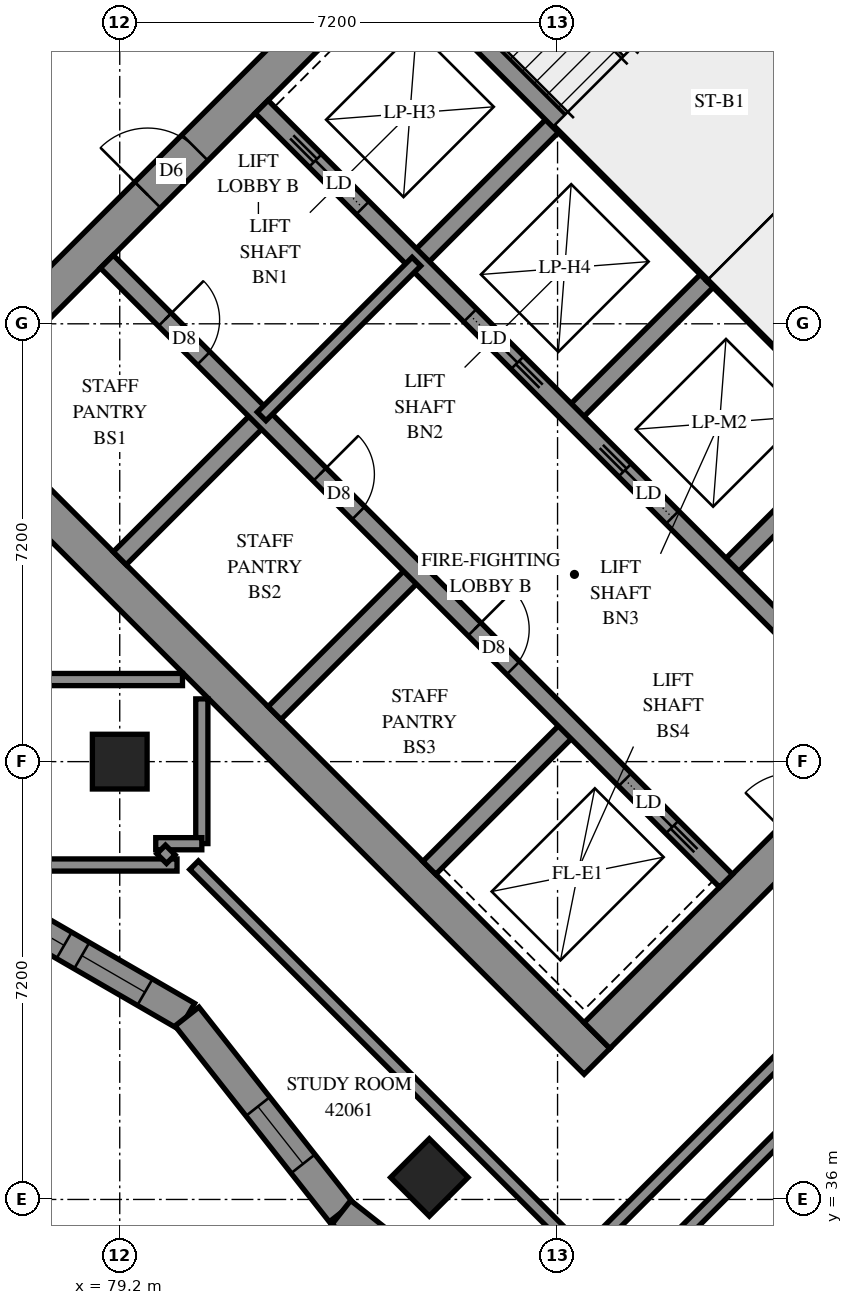
"""IFC4 building model, lengths in metres.
Left out: names, types, materials, properties, quantities, classifications, styles, units other than length and angle.
Written with IfcOpenShell. Run it as: python <this file> out.ifc"""

import sys

from ifc_helpers import new_model, si_unit, direction, frame, frame_2d, origin, origin_2d, place, context, subcontext, project, spatial, polyline, rectangle, outline, extrude, element, fill, save


model = new_model("IFC4")
c1 = context("Model", 3, precision=1e-05, world=origin(), true_north=direction((0.0, 1.0)))
c2 = subcontext(c1, "Body", "Model", "MODEL_VIEW")
j1 = project(units=[si_unit("LENGTHUNIT", "METRE"), si_unit("PLANEANGLEUNIT", "RADIAN")], contexts=[c1])
p1 = place(None, origin())
s1 = spatial("IfcSite", under=j1, at=p1, CompositionType="ELEMENT")
p2 = place(p1, origin())
s2 = spatial("IfcBuilding", under=s1, at=p2, CompositionType="ELEMENT")
p3 = place(p2, frame((0.0, 0.0, 155.8)))
s3 = spatial("IfcBuildingStorey", under=s2, at=p3, CompositionType="ELEMENT", Elevation=155.8)
for number, where, z_axis, x_axis in (
    (1, (79.2, 43.2, 0.0), (0.0, 0.0, 1.0), (1.0, 0.0, 0.0)),
    (2, (84.291, 36.362, 0.0), (0.0, 0.0, 1.0), (0.707, -0.707, 0.0)),
):
    element("IfcColumn", number, at=place(p3, frame(where, z_axis=z_axis, x_axis=x_axis)), inside=s3, PredefinedType="COLUMN", context=c2, shape_type="SweptSolid", body=[
        extrude(rectangle(XDim=0.9, YDim=0.9, at=origin_2d()), origin(), (0.0, 0.0, 1.0), 3.1),
    ])
p4 = place(p3, frame((76.018, 49.302, -0.3), z_axis=(0.0, 0.0, 1.0), x_axis=(0.7071067812, -0.7071067812, 0.0)))
e3 = element("IfcWall", 3, at=p4, inside=s3, PredefinedType="SHEAR", context=c2, shape_type="SweptSolid", body=[
    extrude(rectangle(XDim=15.6, YDim=0.6, at=frame_2d((7.8, 0.0))), origin(), (0.0, 0.0, 1.0), 2.7),
])
p5 = place(p3, frame((86.625, 59.908, -0.3), z_axis=(0.0, 0.0, 1.0), x_axis=(0.7071067812, -0.7071067812, 0.0)))
e4 = element("IfcWall", 4, at=p5, inside=s3, PredefinedType="SHEAR", context=c2, shape_type="SweptSolid", body=[
    extrude(rectangle(XDim=15.6, YDim=0.6, at=frame_2d((7.8, 0.0))), origin(), (0.0, 0.0, 1.0), 2.7),
])
p6 = place(p5, frame((10.6, 0.0, 0.3)))
e5 = element("IfcOpeningElement", 5, at=p6, cuts=e4, PredefinedType="OPENING", context=c2, shape_type="SweptSolid", body=[
    extrude(rectangle(XDim=0.8, YDim=2.1, at=frame_2d((0.4, 1.05))), frame((0.0, 0.31, 0.0), z_axis=(0.0, -1.0, 0.0), x_axis=(1.0, 0.0, 0.0)), (0.0, 0.0, 1.0), 0.62),
])
p7 = place(p3, frame((76.442, 49.302, -0.3), z_axis=(0.0, 0.0, 1.0), x_axis=(0.7071067812, 0.7071067812, 0.0)))
e6 = element("IfcWall", 6, at=p7, inside=s3, PredefinedType="SHEAR", context=c2, shape_type="SweptSolid", body=[
    extrude(rectangle(XDim=14.4, YDim=0.6, at=frame_2d((7.2, 0.0))), origin(), (0.0, 0.0, 1.0), 2.7),
])
p8 = place(p7, frame((4.55, 0.0, 0.3)))
e7 = element("IfcOpeningElement", 7, at=p8, cuts=e6, PredefinedType="OPENING", context=c2, shape_type="SweptSolid", body=[
    extrude(rectangle(XDim=1.1, YDim=2.1, at=frame_2d((0.55, 1.05))), frame((0.0, 0.31, 0.0), z_axis=(0.0, -1.0, 0.0), x_axis=(1.0, 0.0, 0.0)), (0.0, 0.0, 1.0), 0.62),
])
p9 = place(p7, frame((11.35, 0.0, 0.3)))
e8 = element("IfcOpeningElement", 8, at=p9, cuts=e6, PredefinedType="OPENING", context=c2, shape_type="SweptSolid", body=[
    extrude(rectangle(XDim=1.1, YDim=2.1, at=frame_2d((0.55, 1.05))), frame((0.0, 0.31, 0.0), z_axis=(0.0, -1.0, 0.0), x_axis=(1.0, 0.0, 0.0)), (0.0, 0.0, 1.0), 0.62),
])
p10 = place(p3, frame((87.049, 38.695, -0.3), z_axis=(0.0, 0.0, 1.0), x_axis=(0.7071067812, 0.7071067812, 0.0)))
e9 = element("IfcWall", 9, at=p10, inside=s3, PredefinedType="SHEAR", context=c2, shape_type="SweptSolid", body=[
    extrude(rectangle(XDim=14.4, YDim=0.6, at=frame_2d((7.2, 0.0))), origin(), (0.0, 0.0, 1.0), 2.7),
])
p11 = place(p10, frame((4.55, 0.0, 0.3)))
e10 = element("IfcOpeningElement", 10, at=p11, cuts=e9, PredefinedType="OPENING", context=c2, shape_type="SweptSolid", body=[
    extrude(rectangle(XDim=1.1, YDim=2.1, at=frame_2d((0.55, 1.05))), frame((0.0, 0.31, 0.0), z_axis=(0.0, -1.0, 0.0), x_axis=(1.0, 0.0, 0.0)), (0.0, 0.0, 1.0), 0.62),
])
p12 = place(p10, frame((11.35, 0.0, 0.3)))
e11 = element("IfcOpeningElement", 11, at=p12, cuts=e9, PredefinedType="OPENING", context=c2, shape_type="SweptSolid", body=[
    extrude(rectangle(XDim=1.1, YDim=2.1, at=frame_2d((0.55, 1.05))), frame((0.0, 0.31, 0.0), z_axis=(0.0, -1.0, 0.0), x_axis=(1.0, 0.0, 0.0)), (0.0, 0.0, 1.0), 0.62),
])
for number, where, z_axis, x_axis in (
    (12, (79.2, 46.544, 0.0), (0.0, 0.0, 1.0), (0.707, 0.707, 0.0)),
    (13, (84.079, 51.423, 0.0), (0.0, 0.0, 1.0), (0.707, 0.707, 0.0)),
):
    element("IfcWall", number, at=place(p3, frame(where, z_axis=z_axis, x_axis=x_axis)), inside=s3, PredefinedType="SOLIDWALL", context=c2, shape_type="SweptSolid", body=[
        extrude(rectangle(XDim=3.3, YDim=0.3, at=frame_2d((1.65, 0.0))), origin(), (0.0, 0.0, 1.0), 3.1),
    ])
p13 = place(p3, frame((81.746, 43.999, 0.0), z_axis=(0.0, 0.0, 1.0), x_axis=(0.7071067812, 0.7071067812, 0.0)))
e14 = element("IfcWall", 14, at=p13, inside=s3, PredefinedType="SOLIDWALL", context=c2, shape_type="SweptSolid", body=[
    extrude(rectangle(XDim=3.3, YDim=0.3, at=frame_2d((1.65, 0.0))), origin(), (0.0, 0.0, 1.0), 3.1),
])
p14 = place(p3, frame((86.625, 48.878, 0.0), z_axis=(0.0, 0.0, 1.0), x_axis=(0.7071067812, 0.7071067812, 0.0)))
e15 = element("IfcWall", 15, at=p14, inside=s3, PredefinedType="SOLIDWALL", context=c2, shape_type="SweptSolid", body=[
    extrude(rectangle(XDim=3.3, YDim=0.3, at=frame_2d((1.65, 0.0))), origin(), (0.0, 0.0, 1.0), 3.1),
])
p15 = place(p3, frame((84.291, 41.453, 0.0), z_axis=(0.0, 0.0, 1.0), x_axis=(0.7071067812, 0.7071067812, 0.0)))
e16 = element("IfcWall", 16, at=p15, inside=s3, PredefinedType="SOLIDWALL", context=c2, shape_type="SweptSolid", body=[
    extrude(rectangle(XDim=3.3, YDim=0.3, at=frame_2d((1.65, 0.0))), origin(), (0.0, 0.0, 1.0), 3.1),
])
p16 = place(p3, frame((89.17, 46.332, 0.0), z_axis=(0.0, 0.0, 1.0), x_axis=(0.7071067812, 0.7071067812, 0.0)))
e17 = element("IfcWall", 17, at=p16, inside=s3, PredefinedType="SOLIDWALL", context=c2, shape_type="SweptSolid", body=[
    extrude(rectangle(XDim=3.3, YDim=0.3, at=frame_2d((1.65, 0.0))), origin(), (0.0, 0.0, 1.0), 3.1),
])
p17 = place(p3, frame((78.988, 51.423, 0.0), z_axis=(0.0, 0.0, 1.0), x_axis=(0.7071067812, -0.7071067812, 0.0)))
e18 = element("IfcWall", 18, at=p17, inside=s3, PredefinedType="SOLIDWALL", context=c2, shape_type="SweptSolid", body=[
    extrude(rectangle(XDim=14.4, YDim=0.3, at=frame_2d((7.2, 0.0))), origin(), (0.0, 0.0, 1.0), 3.1),
])
p18 = place(p17, frame((1.35, 0.0, 0.0)))
e19 = element("IfcOpeningElement", 19, at=p18, cuts=e18, PredefinedType="OPENING", context=c2, shape_type="SweptSolid", body=[
    extrude(rectangle(XDim=0.9, YDim=2.1, at=frame_2d((0.45, 1.05))), frame((0.0, 0.16, 0.0), z_axis=(0.0, -1.0, 0.0), x_axis=(1.0, 0.0, 0.0)), (0.0, 0.0, 1.0), 0.32),
])
p19 = place(p17, frame((4.95, 0.0, 0.0)))
e20 = element("IfcOpeningElement", 20, at=p19, cuts=e18, PredefinedType="OPENING", context=c2, shape_type="SweptSolid", body=[
    extrude(rectangle(XDim=0.9, YDim=2.1, at=frame_2d((0.45, 1.05))), frame((0.0, 0.16, 0.0), z_axis=(0.0, -1.0, 0.0), x_axis=(1.0, 0.0, 0.0)), (0.0, 0.0, 1.0), 0.32),
])
p20 = place(p17, frame((8.55, 0.0, 0.0)))
e21 = element("IfcOpeningElement", 21, at=p20, cuts=e18, PredefinedType="OPENING", context=c2, shape_type="SweptSolid", body=[
    extrude(rectangle(XDim=0.9, YDim=2.1, at=frame_2d((0.45, 1.05))), frame((0.0, 0.16, 0.0), z_axis=(0.0, -1.0, 0.0), x_axis=(1.0, 0.0, 0.0)), (0.0, 0.0, 1.0), 0.32),
])
p21 = place(p17, frame((12.05, 0.0, 0.0)))
e22 = element("IfcOpeningElement", 22, at=p21, cuts=e18, PredefinedType="OPENING", context=c2, shape_type="SweptSolid", body=[
    extrude(rectangle(XDim=1.1, YDim=2.1, at=frame_2d((0.55, 1.05))), frame((0.0, 0.16, 0.0), z_axis=(0.0, -1.0, 0.0), x_axis=(1.0, 0.0, 0.0)), (0.0, 0.0, 1.0), 0.32),
])
p22 = place(p3, frame((81.534, 53.969, 0.0), z_axis=(0.0, 0.0, 1.0), x_axis=(0.707103309, -0.7071102534, 0.0)))
e23 = element("IfcWall", 23, at=p22, inside=s3, PredefinedType="SOLIDWALL", context=c2, shape_type="SweptSolid", body=[
    extrude(rectangle(XDim=14.4, YDim=0.3, at=frame_2d((7.2, 0.0))), origin(), (0.0, 0.0, 1.0), 3.1),
])
p23 = place(p22, frame((1.25, 0.0, 0.0)))
e24 = element("IfcOpeningElement", 24, at=p23, cuts=e23, PredefinedType="OPENING", context=c2, shape_type="SweptSolid", body=[
    extrude(rectangle(XDim=1.1, YDim=2.1, at=frame_2d((0.55, 1.05))), frame((0.0, 0.16, 0.0), z_axis=(0.0, -1.0, 0.0), x_axis=(1.0, 0.0, 0.0)), (0.0, 0.0, 1.0), 0.32),
])
p24 = place(p22, frame((4.85, 0.0, 0.0)))
e25 = element("IfcOpeningElement", 25, at=p24, cuts=e23, PredefinedType="OPENING", context=c2, shape_type="SweptSolid", body=[
    extrude(rectangle(XDim=1.1, YDim=2.1, at=frame_2d((0.55, 1.05))), frame((0.0, 0.16, 0.0), z_axis=(0.0, -1.0, 0.0), x_axis=(1.0, 0.0, 0.0)), (0.0, 0.0, 1.0), 0.32),
])
p25 = place(p22, frame((8.45, 0.0, 0.0)))
e26 = element("IfcOpeningElement", 26, at=p25, cuts=e23, PredefinedType="OPENING", context=c2, shape_type="SweptSolid", body=[
    extrude(rectangle(XDim=1.1, YDim=2.1, at=frame_2d((0.55, 1.05))), frame((0.0, 0.16, 0.0), z_axis=(0.0, -1.0, 0.0), x_axis=(1.0, 0.0, 0.0)), (0.0, 0.0, 1.0), 0.32),
])
p26 = place(p22, frame((12.05, 0.0, 0.0)))
e27 = element("IfcOpeningElement", 27, at=p26, cuts=e23, PredefinedType="OPENING", context=c2, shape_type="SweptSolid", body=[
    extrude(rectangle(XDim=1.1, YDim=2.1, at=frame_2d((0.55, 1.05))), frame((0.0, 0.16, 0.0), z_axis=(0.0, -1.0, 0.0), x_axis=(1.0, 0.0, 0.0)), (0.0, 0.0, 1.0), 0.32),
])
for number, where, z_axis, x_axis in (
    (28, (83.867, 56.302, 0.0), (0.0, 0.0, 1.0), (0.707, -0.707, 0.0)),
    (29, (88.958, 51.211, 0.0), (0.0, 0.0, 1.0), (0.707, -0.707, 0.0)),
):
    element("IfcWall", number, at=place(p3, frame(where, z_axis=z_axis, x_axis=x_axis)), inside=s3, PredefinedType="SOLIDWALL", context=c2, shape_type="SweptSolid", body=[
        extrude(rectangle(XDim=7.2, YDim=0.3, at=frame_2d((3.6, 0.0))), origin(), (0.0, 0.0, 1.0), 3.1),
    ])
p27 = place(p3, frame((88.958, 51.211, 0.0), z_axis=(0.0, 0.0, 1.0), x_axis=(0.7071067812, 0.7071067812, 0.0)))
e30 = element("IfcWall", 30, at=p27, inside=s3, PredefinedType="SOLIDWALL", context=c2, shape_type="SweptSolid", body=[
    extrude(rectangle(XDim=4.2, YDim=0.3, at=frame_2d((2.1, 0.0))), origin(), (0.0, 0.0, 1.0), 3.1),
])
p28 = place(p3, frame((76.609, 41.148, 0.0), z_axis=(0.0, 0.0, 1.0), x_axis=(0.8655245779, -0.5008664544, 0.0)))
e31 = element("IfcWall", 31, at=p28, inside=s3, PredefinedType="SOLIDWALL", context=c2, shape_type="SweptSolid", body=[
    extrude(outline(polyline([(0.027, -0.25), (4.223, -0.25), (4.319, 0.25), (-0.027, 0.25), (0.027, -0.25)])), origin(), (0.0, 0.0, 1.0), 3.1),
])
p29 = place(p28, frame((0.736, 0.0, 0.45)))
e32 = element("IfcOpeningElement", 32, at=p29, cuts=e31, PredefinedType="OPENING", context=c2, shape_type="SweptSolid", body=[
    extrude(rectangle(XDim=1.2, YDim=2.5, at=frame_2d((0.6, 1.25))), frame((0.0, 0.26, 0.0), z_axis=(0.0, -1.0, 0.0), x_axis=(1.0, 0.0, 0.0)), (0.0, 0.0, 1.0), 0.52),
])
p30 = place(p28, frame((2.272, 0.0, 0.45)))
e33 = element("IfcOpeningElement", 33, at=p30, cuts=e31, PredefinedType="OPENING", context=c2, shape_type="SweptSolid", body=[
    extrude(rectangle(XDim=1.2, YDim=2.5, at=frame_2d((0.6, 1.25))), frame((0.0, 0.26, 0.0), z_axis=(0.0, -1.0, 0.0), x_axis=(1.0, 0.0, 0.0)), (0.0, 0.0, 1.0), 0.52),
])
p31 = place(p3, frame((80.306, 39.009, 0.0), z_axis=(0.0, 0.0, 1.0), x_axis=(0.6186848353, -0.7856392777, 0.0)))
e34 = element("IfcWall", 34, at=p31, inside=s3, PredefinedType="SOLIDWALL", context=c2, shape_type="SweptSolid", body=[
    extrude(outline(polyline([(0.048, -0.25), (4.131, -0.25), (4.071, 0.25), (-0.048, 0.25), (0.048, -0.25)])), origin(), (0.0, 0.0, 1.0), 3.1),
])
p32 = place(p31, frame((1.884, 0.0, 0.45)))
e35 = element("IfcOpeningElement", 35, at=p32, cuts=e34, PredefinedType="OPENING", context=c2, shape_type="SweptSolid", body=[
    extrude(rectangle(XDim=1.2, YDim=2.5, at=frame_2d((0.6, 1.25))), frame((0.0, 0.26, 0.0), z_axis=(0.0, -1.0, 0.0), x_axis=(1.0, 0.0, 0.0)), (0.0, 0.0, 1.0), 0.52),
])
p33 = place(p3, frame((82.844, 35.787, 0.0), z_axis=(0.0, 0.0, 1.0), x_axis=(0.7856464341, -0.6186757476, 0.0)))
e36 = element("IfcWall", 36, at=p33, inside=s3, PredefinedType="SOLIDWALL", context=c2, shape_type="SweptSolid", body=[
    extrude(outline(polyline([(-0.03, -0.25), (4.053, -0.25), (4.112, 0.25), (0.03, 0.25), (-0.03, -0.25)])), origin(), (0.0, 0.0, 1.0), 3.1),
])
p34 = place(p33, frame((0.852, 0.0, 0.45)))
e37 = element("IfcOpeningElement", 37, at=p34, cuts=e36, PredefinedType="OPENING", context=c2, shape_type="SweptSolid", body=[
    extrude(rectangle(XDim=2.8, YDim=2.5, at=frame_2d((1.4, 1.25))), frame((0.0, 0.26, 0.0), z_axis=(0.0, -1.0, 0.0), x_axis=(1.0, 0.0, 0.0)), (0.0, 0.0, 1.0), 0.52),
])
p35 = place(p3, frame((81.534, 48.878, 0.0), z_axis=(0.0, 0.0, 1.0), x_axis=(0.707092892, 0.7071206701, 0.0)))
e38 = element("IfcWall", 38, at=p35, inside=s3, PredefinedType="PARTITIONING", context=c2, shape_type="SweptSolid", body=[
    extrude(rectangle(XDim=3.6, YDim=0.2, at=frame_2d((1.8, 0.0))), origin(), (0.0, 0.0, 1.0), 3.1),
])
p36 = place(p3, frame((86.841, 63.093, 0.0), z_axis=(0.0, 0.0, 1.0), x_axis=(0.7071067812, -0.7071067812, 0.0)))
e39 = element("IfcWall", 39, at=p36, inside=s3, PredefinedType="PARTITIONING", context=c2, shape_type="SweptSolid", body=[
    extrude(rectangle(XDim=12.239, YDim=0.2, at=frame_2d((6.119, 0.0))), origin(), (0.0, 0.0, 1.0), 3.1),
])
p37 = place(p36, frame((10.634, 0.0, 0.0)))
e40 = element("IfcOpeningElement", 40, at=p37, cuts=e39, PredefinedType="OPENING", context=c2, shape_type="SweptSolid", body=[
    extrude(rectangle(XDim=0.9, YDim=2.1, at=frame_2d((0.45, 1.05))), frame((0.0, 0.11, 0.0), z_axis=(0.0, -1.0, 0.0), x_axis=(1.0, 0.0, 0.0)), (0.0, 0.0, 1.0), 0.22),
])
p38 = place(p3, frame((80.423, 41.497, 0.0), z_axis=(0.0, 0.0, 1.0), x_axis=(0.7071067812, -0.7071067812, 0.0)))
e41 = element("IfcWall", 41, at=p38, inside=s3, PredefinedType="PARTITIONING", context=c2, shape_type="SweptSolid", body=[
    extrude(rectangle(XDim=9.065, YDim=0.2, at=frame_2d((4.532, 0.0))), origin(), (0.0, 0.0, 1.0), 3.1),
])
p39 = place(p3, frame((86.837, 35.091, 0.0), z_axis=(0.0, 0.0, 1.0), x_axis=(0.7071067812, 0.7071067812, 0.0)))
e42 = element("IfcWall", 42, at=p39, inside=s3, PredefinedType="PARTITIONING", context=c2, shape_type="SweptSolid", body=[
    extrude(rectangle(XDim=7.597, YDim=0.2, at=frame_2d((3.799, 0.0))), origin(), (0.0, 0.0, 1.0), 3.1),
])
p40 = place(p39, frame((6.395, 0.0, 0.0)))
e43 = element("IfcOpeningElement", 43, at=p40, cuts=e42, PredefinedType="OPENING", context=c2, shape_type="SweptSolid", body=[
    extrude(rectangle(XDim=1.0, YDim=2.1, at=frame_2d((0.5, 1.05))), frame((0.0, 0.11, 0.0), z_axis=(0.0, -1.0, 0.0), x_axis=(1.0, 0.0, 0.0)), (0.0, 0.0, 1.0), 0.22),
])
p41 = place(p3, frame((86.33, 33.311, 0.0), z_axis=(0.0, 0.0, 1.0), x_axis=(0.7071067812, 0.7071067812, 0.0)))
e44 = element("IfcWall", 44, at=p41, inside=s3, PredefinedType="PARTITIONING", context=c2, shape_type="SweptSolid", body=[
    extrude(rectangle(XDim=6.816, YDim=0.2, at=frame_2d((3.408, 0.0))), origin(), (0.0, 0.0, 1.0), 3.1),
])
p42 = place(p3, frame((89.831, 31.721, 0.0), z_axis=(0.0, 0.0, 1.0), x_axis=(0.7071067812, 0.7071067812, 0.0)))
e45 = element("IfcWall", 45, at=p42, inside=s3, PredefinedType="PARTITIONING", context=c2, shape_type="SweptSolid", body=[
    extrude(rectangle(XDim=5.928, YDim=0.2, at=frame_2d((2.964, 0.0))), origin(), (0.0, 0.0, 1.0), 3.1),
])
p43 = place(p3, frame((77.502, 41.5, 0.0), z_axis=(0.0, 0.0, 1.0), x_axis=(1.0, 0.0, 0.0)))
e46 = element("IfcWall", 46, at=p43, inside=s3, PredefinedType="PARTITIONING", context=c2, shape_type="SweptSolid", body=[
    extrude(rectangle(XDim=2.64, YDim=0.2, at=frame_2d((1.32, 0.0))), origin(), (0.0, 0.0, 1.0), 3.1),
])
for number, where, z_axis, x_axis in (
    (47, (80.55, 41.852, 0.0), (0.0, 0.0, 1.0), (0.0, 1.0, 0.0)),
    (48, (77.852, 44.55, 0.0), (0.0, 0.0, 1.0), (1.0, 0.0, 0.0)),
):
    element("IfcWall", number, at=place(p3, frame(where, z_axis=z_axis, x_axis=x_axis)), inside=s3, PredefinedType="PARTITIONING", context=c2, shape_type="SweptSolid", body=[
        extrude(rectangle(XDim=2.38, YDim=0.2, at=frame_2d((1.19, 0.0))), origin(), (0.0, 0.0, 1.0), 3.1),
    ])
p44 = place(p3, frame((79.792, 41.85, 0.0), z_axis=(0.0, 0.0, 1.0), x_axis=(1.0, 0.0, 0.0)))
e49 = element("IfcWall", 49, at=p44, inside=s3, PredefinedType="PARTITIONING", context=c2, shape_type="SweptSolid", body=[
    extrude(rectangle(XDim=0.758, YDim=0.2, at=frame_2d((0.379, 0.0))), origin(), (0.0, 0.0, 1.0), 3.1),
])
p45 = place(p3, frame((79.881, 41.755, 0.0), z_axis=(0.0, 0.0, 1.0), x_axis=(0.7071067812, -0.7071067812, 0.0)))
e50 = element("IfcWall", 50, at=p45, inside=s3, PredefinedType="PARTITIONING", context=c2, shape_type="SweptSolid", body=[
    extrude(rectangle(XDim=0.225, YDim=0.2, at=frame_2d((0.113, 0.0))), origin(), (0.0, 0.0, 1.0), 3.1),
])
p46 = place(p29, origin())
e51 = element("IfcWindow", 51, at=p46, inside=s3, PartitioningType="SINGLE_PANEL", PredefinedType="WINDOW", context=c2, shape_type="SweptSolid", body=[
    extrude(rectangle(XDim=1.2, YDim=2.5, at=frame_2d((0.6, 1.25))), frame((0.0, 0.18, 0.0), z_axis=(0.0, -1.0, 0.0), x_axis=(1.0, 0.0, 0.0)), (0.0, 0.0, 1.0), 0.06),
])
fill(e32, e51)
p47 = place(p30, origin())
e52 = element("IfcWindow", 52, at=p47, inside=s3, PartitioningType="SINGLE_PANEL", PredefinedType="WINDOW", context=c2, shape_type="SweptSolid", body=[
    extrude(rectangle(XDim=1.2, YDim=2.5, at=frame_2d((0.6, 1.25))), frame((0.0, 0.18, 0.0), z_axis=(0.0, -1.0, 0.0), x_axis=(1.0, 0.0, 0.0)), (0.0, 0.0, 1.0), 0.06),
])
fill(e33, e52)
p48 = place(p32, origin())
e53 = element("IfcWindow", 53, at=p48, inside=s3, PartitioningType="SINGLE_PANEL", PredefinedType="WINDOW", context=c2, shape_type="SweptSolid", body=[
    extrude(rectangle(XDim=1.2, YDim=2.5, at=frame_2d((0.6, 1.25))), frame((0.0, 0.18, 0.0), z_axis=(0.0, -1.0, 0.0), x_axis=(1.0, 0.0, 0.0)), (0.0, 0.0, 1.0), 0.06),
])
fill(e35, e53)
p49 = place(p8, origin())
e54 = element("IfcDoor", 54, at=p49, inside=s3, OperationType="DOUBLE_DOOR_SINGLE_SWING", PredefinedType="DOOR", context=c2, shape_type="SweptSolid", body=[
    extrude(rectangle(XDim=1.1, YDim=2.1, at=frame_2d((0.55, 1.05))), frame((0.0, 0.025, 0.0), z_axis=(0.0, -1.0, 0.0), x_axis=(1.0, 0.0, 0.0)), (0.0, 0.0, 1.0), 0.05),
])
fill(e7, e54)
p50 = place(p18, origin())
e55 = element("IfcDoor", 55, at=p50, inside=s3, OperationType="SINGLE_SWING_LEFT", PredefinedType="DOOR", context=c2, shape_type="SweptSolid", body=[
    extrude(rectangle(XDim=0.9, YDim=2.1, at=frame_2d((0.45, 1.05))), frame((0.0, 0.025, 0.0), z_axis=(0.0, -1.0, 0.0), x_axis=(1.0, 0.0, 0.0)), (0.0, 0.0, 1.0), 0.05),
])
fill(e19, e55)
p51 = place(p19, origin())
e56 = element("IfcDoor", 56, at=p51, inside=s3, OperationType="SINGLE_SWING_LEFT", PredefinedType="DOOR", context=c2, shape_type="SweptSolid", body=[
    extrude(rectangle(XDim=0.9, YDim=2.1, at=frame_2d((0.45, 1.05))), frame((0.0, 0.025, 0.0), z_axis=(0.0, -1.0, 0.0), x_axis=(1.0, 0.0, 0.0)), (0.0, 0.0, 1.0), 0.05),
])
fill(e20, e56)
p52 = place(p20, origin())
e57 = element("IfcDoor", 57, at=p52, inside=s3, OperationType="SINGLE_SWING_LEFT", PredefinedType="DOOR", context=c2, shape_type="SweptSolid", body=[
    extrude(rectangle(XDim=0.9, YDim=2.1, at=frame_2d((0.45, 1.05))), frame((0.0, 0.025, 0.0), z_axis=(0.0, -1.0, 0.0), x_axis=(1.0, 0.0, 0.0)), (0.0, 0.0, 1.0), 0.05),
])
fill(e21, e57)
p53 = place(p21, origin())
e58 = element("IfcDoor", 58, at=p53, inside=s3, OperationType="SLIDING_TO_RIGHT", PredefinedType="DOOR", context=c2, shape_type="SweptSolid", body=[
    extrude(rectangle(XDim=1.1, YDim=2.1, at=frame_2d((0.55, 1.05))), frame((0.0, 0.025, 0.0), z_axis=(0.0, -1.0, 0.0), x_axis=(1.0, 0.0, 0.0)), (0.0, 0.0, 1.0), 0.05),
])
fill(e22, e58)
p54 = place(p23, origin())
e59 = element("IfcDoor", 59, at=p54, inside=s3, OperationType="SLIDING_TO_LEFT", PredefinedType="DOOR", context=c2, shape_type="SweptSolid", body=[
    extrude(rectangle(XDim=1.1, YDim=2.1, at=frame_2d((0.55, 1.05))), frame((0.0, 0.025, 0.0), z_axis=(0.0, -1.0, 0.0), x_axis=(1.0, 0.0, 0.0)), (0.0, 0.0, 1.0), 0.05),
])
fill(e24, e59)
p55 = place(p24, origin())
e60 = element("IfcDoor", 60, at=p55, inside=s3, OperationType="SLIDING_TO_RIGHT", PredefinedType="DOOR", context=c2, shape_type="SweptSolid", body=[
    extrude(rectangle(XDim=1.1, YDim=2.1, at=frame_2d((0.55, 1.05))), frame((0.0, 0.025, 0.0), z_axis=(0.0, -1.0, 0.0), x_axis=(1.0, 0.0, 0.0)), (0.0, 0.0, 1.0), 0.05),
])
fill(e25, e60)
p56 = place(p25, origin())
e61 = element("IfcDoor", 61, at=p56, inside=s3, OperationType="SLIDING_TO_LEFT", PredefinedType="DOOR", context=c2, shape_type="SweptSolid", body=[
    extrude(rectangle(XDim=1.1, YDim=2.1, at=frame_2d((0.55, 1.05))), frame((0.0, 0.025, 0.0), z_axis=(0.0, -1.0, 0.0), x_axis=(1.0, 0.0, 0.0)), (0.0, 0.0, 1.0), 0.05),
])
fill(e26, e61)
save(model, sys.argv[1])
